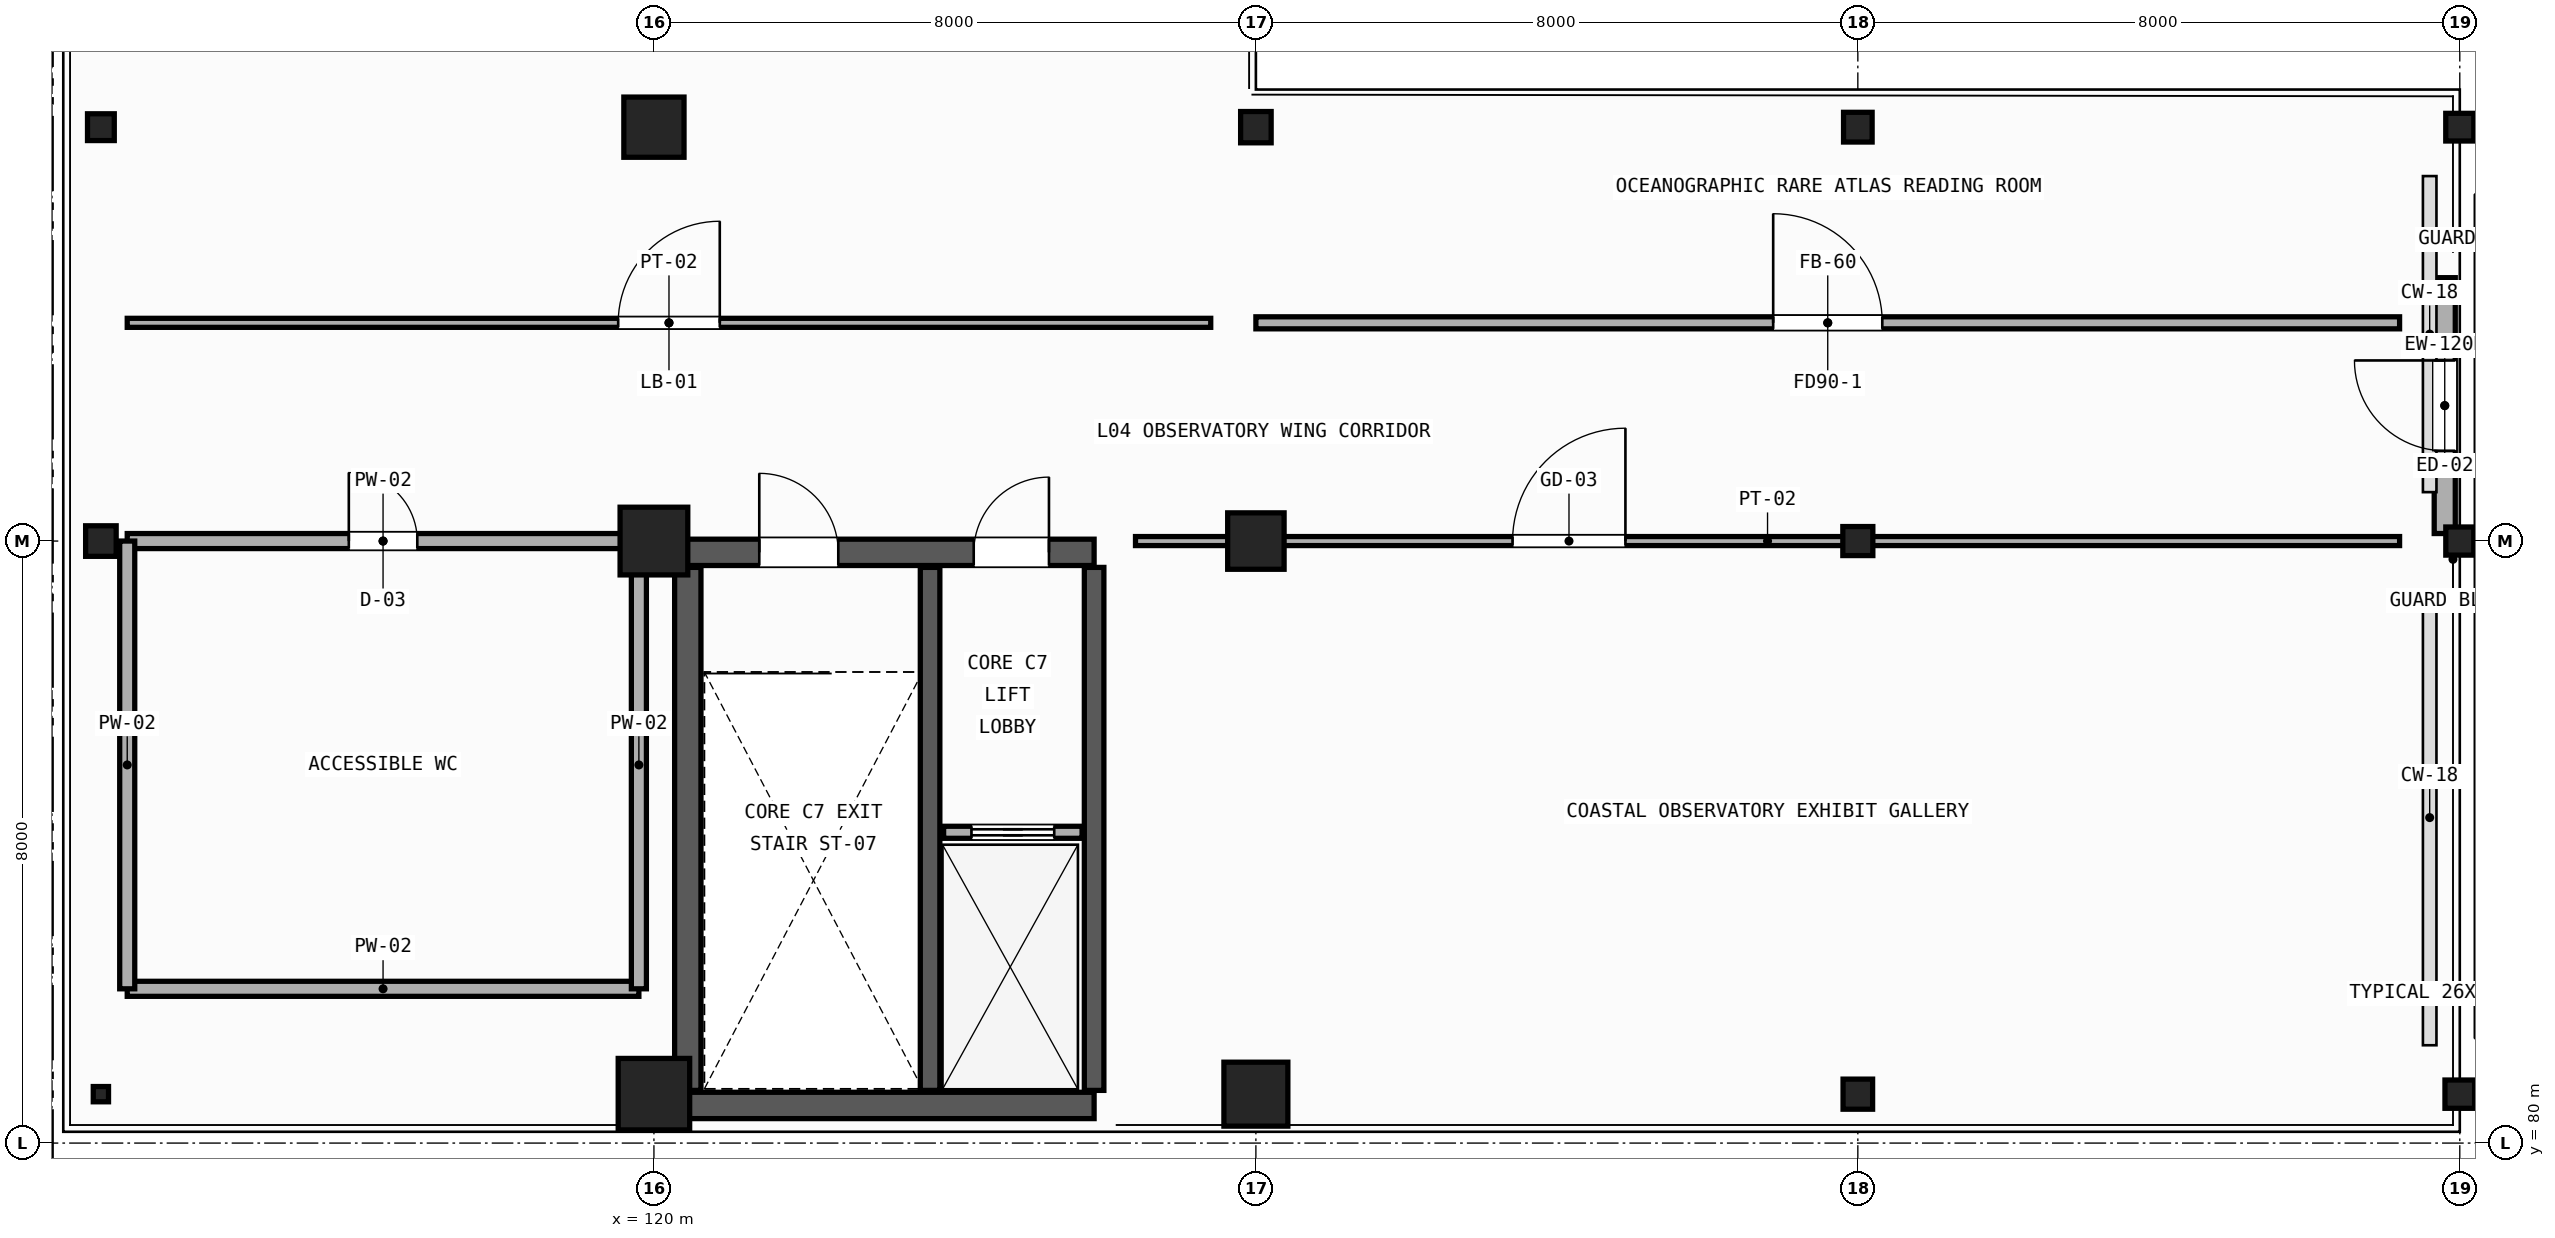
"""IFC4 building model, lengths in metres.
Left out: names, types, materials, properties, quantities, classifications, styles, units other than length and angle.
Written with IfcOpenShell. Run it as: python <this file> out.ifc"""

import sys

from ifc_helpers import new_model, si_unit, direction, frame, frame_2d, origin, origin_2d, place, context, subcontext, project, spatial, rectangle, hollow_rectangle, circle, hollow_circle, i_section, extrude, element, fill, save


model = new_model("IFC4")
c1 = context("Model", 3, precision=1e-05, world=origin(), true_north=direction((0.0, 1.0)))
c2 = subcontext(c1, "Body", "Model", "MODEL_VIEW")
j1 = project(units=[si_unit("LENGTHUNIT", "METRE"), si_unit("PLANEANGLEUNIT", "RADIAN")], contexts=[c1])
p1 = place(None, origin())
s1 = spatial("IfcSite", under=j1, at=p1, CompositionType="ELEMENT")
p2 = place(p1, origin())
s2 = spatial("IfcBuilding", under=s1, at=p2, CompositionType="ELEMENT")
p3 = place(p2, frame((0.0, 0.0, 19.8)))
s3 = spatial("IfcBuildingStorey", under=s2, at=p3, CompositionType="ELEMENT", Elevation=19.8)
p4 = place(p3, frame((112.65, 80.65, 0.0), z_axis=(0.0, 0.0, 1.0), x_axis=(1.0, 0.0, 0.0)))
e1 = element("IfcColumn", 1, at=p4, inside=s3, PredefinedType="COLUMN", context=c2, shape_type="SweptSolid", body=[
    extrude(hollow_rectangle(XDim=0.203, YDim=0.203, WallThickness=0.009, InnerFilletRadius=0.009, OuterFilletRadius=0.018, at=origin_2d()), origin(), (0.0, 0.0, 1.0), 4.8),
])
p5 = place(p3, frame((112.65, 88.0, 0.0), z_axis=(0.0, 0.0, 1.0), x_axis=(0.0, 1.0, 0.0)))
e2 = element("IfcColumn", 2, at=p5, inside=s3, PredefinedType="COLUMN", context=c2, shape_type="SweptSolid", body=[
    extrude(hollow_circle(Radius=0.203, WallThickness=0.012, at=origin_2d()), origin(), (0.0, 0.0, 1.0), 4.8),
])
p6 = place(p3, frame((112.65, 93.5, 0.0), z_axis=(0.0, 0.0, 1.0), x_axis=(1.0, 0.0, 0.0)))
e3 = element("IfcColumn", 3, at=p6, inside=s3, PredefinedType="COLUMN", context=c2, shape_type="SweptSolid", body=[
    extrude(hollow_circle(Radius=0.178, WallThickness=0.012, at=origin_2d()), origin(), (0.0, 0.0, 1.0), 4.8),
])
p7 = place(p3, frame((120.0, 80.65, 0.0), z_axis=(0.0, 0.0, 1.0), x_axis=(0.0, 1.0, 0.0)))
e4 = element("IfcColumn", 4, at=p7, inside=s3, PredefinedType="COLUMN", context=c2, shape_type="SweptSolid", body=[
    extrude(rectangle(XDim=0.95, YDim=0.95, at=origin_2d()), origin(), (0.0, 0.0, 1.0), 4.8),
])
p8 = place(p3, frame((120.0, 88.0, 0.0), z_axis=(0.0, 0.0, 1.0), x_axis=(1.0, 0.0, 0.0)))
e5 = element("IfcColumn", 5, at=p8, inside=s3, PredefinedType="COLUMN", context=c2, shape_type="SweptSolid", body=[
    extrude(rectangle(XDim=0.9, YDim=0.9, at=origin_2d()), origin(), (0.0, 0.0, 1.0), 6.48),
])
p9 = place(p3, frame((120.0, 93.5, 0.0), z_axis=(0.0, 0.0, 1.0), x_axis=(0.0, 1.0, 0.0)))
e6 = element("IfcColumn", 6, at=p9, inside=s3, PredefinedType="COLUMN", context=c2, shape_type="SweptSolid", body=[
    extrude(rectangle(XDim=0.8, YDim=0.8, at=origin_2d()), origin(), (0.0, 0.0, 1.0), 4.8),
])
p10 = place(p3, frame((128.0, 80.65, 0.0), z_axis=(0.0, 0.0, 1.0), x_axis=(1.0, 0.0, 0.0)))
e7 = element("IfcColumn", 7, at=p10, inside=s3, PredefinedType="COLUMN", context=c2, shape_type="SweptSolid", body=[
    extrude(circle(Radius=0.425, at=origin_2d()), origin(), (0.0, 0.0, 1.0), 4.8),
])
p11 = place(p3, frame((128.0, 88.0, 0.0), z_axis=(0.0, 0.0, 1.0), x_axis=(0.0, 1.0, 0.0)))
e8 = element("IfcColumn", 8, at=p11, inside=s3, PredefinedType="COLUMN", context=c2, shape_type="SweptSolid", body=[
    extrude(circle(Radius=0.375, at=origin_2d()), origin(), (0.0, 0.0, 1.0), 6.48),
])
p12 = place(p3, frame((128.0, 93.5, 0.0), z_axis=(0.0, 0.0, 1.0), x_axis=(1.0, 0.0, 0.0)))
e9 = element("IfcColumn", 9, at=p12, inside=s3, PredefinedType="COLUMN", context=c2, shape_type="SweptSolid", body=[
    extrude(i_section(OverallWidth=0.406, OverallDepth=0.416, WebThickness=0.03, FlangeThickness=0.048, FilletRadius=0.015, at=origin_2d()), origin(), (0.0, 0.0, 1.0), 4.8),
])
p13 = place(p3, frame((136.0, 80.65, 0.0), z_axis=(0.0, 0.0, 1.0), x_axis=(0.0, 1.0, 0.0)))
e10 = element("IfcColumn", 10, at=p13, inside=s3, PredefinedType="COLUMN", context=c2, shape_type="SweptSolid", body=[
    extrude(i_section(OverallWidth=0.4, OverallDepth=0.393, WebThickness=0.023, FlangeThickness=0.037, FilletRadius=0.015, at=origin_2d()), origin(), (0.0, 0.0, 1.0), 4.8),
])
p14 = place(p3, frame((136.0, 88.0, 0.0), z_axis=(0.0, 0.0, 1.0), x_axis=(1.0, 0.0, 0.0)))
e11 = element("IfcColumn", 11, at=p14, inside=s3, PredefinedType="COLUMN", context=c2, shape_type="SweptSolid", body=[
    extrude(i_section(OverallWidth=0.399, OverallDepth=0.386, WebThickness=0.021, FlangeThickness=0.033, FilletRadius=0.015, at=origin_2d()), origin(), (0.0, 0.0, 1.0), 6.48),
])
p15 = place(p3, frame((136.0, 93.5, 0.0), z_axis=(0.0, 0.0, 1.0), x_axis=(0.0, 1.0, 0.0)))
e12 = element("IfcColumn", 12, at=p15, inside=s3, PredefinedType="COLUMN", context=c2, shape_type="SweptSolid", body=[
    extrude(i_section(OverallWidth=0.395, OverallDepth=0.38, WebThickness=0.019, FlangeThickness=0.03, FilletRadius=0.015, at=origin_2d()), origin(), (0.0, 0.0, 1.0), 4.8),
])
p16 = place(p3, frame((144.0, 80.65, 0.0), z_axis=(0.0, 0.0, 1.0), x_axis=(1.0, 0.0, 0.0)))
e13 = element("IfcColumn", 13, at=p16, inside=s3, PredefinedType="COLUMN", context=c2, shape_type="SweptSolid", body=[
    extrude(i_section(OverallWidth=0.394, OverallDepth=0.376, WebThickness=0.017, FlangeThickness=0.028, FilletRadius=0.015, at=origin_2d()), origin(), (0.0, 0.0, 1.0), 4.8),
])
p17 = place(p3, frame((144.0, 88.0, 0.0), z_axis=(0.0, 0.0, 1.0), x_axis=(0.0, 1.0, 0.0)))
e14 = element("IfcColumn", 14, at=p17, inside=s3, PredefinedType="COLUMN", context=c2, shape_type="SweptSolid", body=[
    extrude(i_section(OverallWidth=0.374, OverallDepth=0.372, WebThickness=0.016, FlangeThickness=0.026, FilletRadius=0.015, at=origin_2d()), origin(), (0.0, 0.0, 1.0), 4.8),
])
p18 = place(p3, frame((144.0, 93.5, 0.0), z_axis=(0.0, 0.0, 1.0), x_axis=(1.0, 0.0, 0.0)))
e15 = element("IfcColumn", 15, at=p18, inside=s3, PredefinedType="COLUMN", context=c2, shape_type="SweptSolid", body=[
    extrude(i_section(OverallWidth=0.373, OverallDepth=0.368, WebThickness=0.015, FlangeThickness=0.024, FilletRadius=0.015, at=origin_2d()), origin(), (0.0, 0.0, 1.0), 4.8),
])
p19 = place(p3, frame((143.8, 88.1, 0.0), z_axis=(0.0, 0.0, 1.0), x_axis=(0.0, 1.0, 0.0)))
e16 = element("IfcWall", 16, at=p19, inside=s3, PredefinedType="STANDARD", context=c2, shape_type="SweptSolid", body=[
    extrude(rectangle(XDim=3.4, YDim=0.28, at=frame_2d((1.7, 0.0))), origin(), (0.0, 0.0, 1.0), 4.4),
])
p20 = place(p19, frame((1.1, 0.0, 0.0)))
e17 = element("IfcOpeningElement", 17, at=p20, cuts=e16, PredefinedType="OPENING", context=c2, shape_type="SweptSolid", body=[
    extrude(rectangle(XDim=1.2, YDim=2.15, at=frame_2d((0.6, 1.075))), frame((0.0, 0.15, 0.0), z_axis=(0.0, -1.0, 0.0), x_axis=(1.0, 0.0, 0.0)), (0.0, 0.0, 1.0), 0.3),
])
p21 = place(p3, frame((120.0, 87.85, 0.0), z_axis=(0.0, 0.0, 1.0), x_axis=(1.0, 0.0, 0.0)))
e18 = element("IfcWall", 18, at=p21, inside=s3, PredefinedType="SHEAR", context=c2, shape_type="SweptSolid", body=[
    extrude(rectangle(XDim=5.85, YDim=0.35, at=frame_2d((2.925, 0.0))), origin(), (0.0, 0.0, 1.0), 4.3),
])
p22 = place(p21, frame((1.4, 0.0, 0.0)))
e19 = element("IfcOpeningElement", 19, at=p22, cuts=e18, PredefinedType="OPENING", context=c2, shape_type="SweptSolid", body=[
    extrude(rectangle(XDim=1.05, YDim=2.1, at=frame_2d((0.525, 1.05))), frame((0.0, 0.185, 0.0), z_axis=(0.0, -1.0, 0.0), x_axis=(1.0, 0.0, 0.0)), (0.0, 0.0, 1.0), 0.37),
])
p23 = place(p21, frame((4.25, 0.0, 0.0)))
e20 = element("IfcOpeningElement", 20, at=p23, cuts=e18, PredefinedType="OPENING", context=c2, shape_type="SweptSolid", body=[
    extrude(rectangle(XDim=1.0, YDim=2.15, at=frame_2d((0.5, 1.075))), frame((0.0, 0.185, 0.0), z_axis=(0.0, -1.0, 0.0), x_axis=(1.0, 0.0, 0.0)), (0.0, 0.0, 1.0), 0.37),
])
p24 = place(p3, frame((120.0, 80.5, 0.0), z_axis=(0.0, 0.0, 1.0), x_axis=(1.0, 0.0, 0.0)))
e21 = element("IfcWall", 21, at=p24, inside=s3, PredefinedType="SHEAR", context=c2, shape_type="SweptSolid", body=[
    extrude(rectangle(XDim=5.85, YDim=0.35, at=frame_2d((2.925, 0.0))), origin(), (0.0, 0.0, 1.0), 4.3),
])
p25 = place(p3, frame((120.45, 80.7, 0.0), z_axis=(0.0, 0.0, 1.0), x_axis=(0.0, 1.0, 0.0)))
e22 = element("IfcWall", 22, at=p25, inside=s3, PredefinedType="SHEAR", context=c2, shape_type="SweptSolid", body=[
    extrude(rectangle(XDim=6.95, YDim=0.35, at=frame_2d((3.475, 0.0))), origin(), (0.0, 0.0, 1.0), 4.3),
])
for number, where, z_axis, x_axis in (
    (23, (125.85, 80.7, 0.0), (0.0, 0.0, 1.0), (0.0, 1.0, 0.0)),
    (24, (123.67, 80.7, 0.0), (0.0, 0.0, 1.0), (0.0, 1.0, 0.0)),
):
    element("IfcWall", number, at=place(p3, frame(where, z_axis=z_axis, x_axis=x_axis)), inside=s3, PredefinedType="SHEAR", context=c2, shape_type="SweptSolid", body=[
        extrude(rectangle(XDim=6.95, YDim=0.26, at=frame_2d((3.475, 0.0))), origin(), (0.0, 0.0, 1.0), 4.3),
    ])
p26 = place(p3, frame((123.85, 84.13, 0.0), z_axis=(0.0, 0.0, 1.0), x_axis=(1.0, 0.0, 0.0)))
e25 = element("IfcWall", 25, at=p26, inside=s3, PredefinedType="PARTITIONING", context=c2, shape_type="SweptSolid", body=[
    extrude(rectangle(XDim=1.84, YDim=0.16, at=frame_2d((0.92, 0.0))), origin(), (0.0, 0.0, 1.0), 3.6),
])
p27 = place(p26, frame((0.37, 0.0, 0.0)))
e26 = element("IfcOpeningElement", 26, at=p27, cuts=e25, PredefinedType="OPENING", context=c2, shape_type="SweptSolid", body=[
    extrude(rectangle(XDim=1.1, YDim=2.15, at=frame_2d((0.55, 1.075))), frame((0.0, 0.09, 0.0), z_axis=(0.0, -1.0, 0.0), x_axis=(1.0, 0.0, 0.0)), (0.0, 0.0, 1.0), 0.18),
])
p28 = place(p3, frame((113.0, 88.0, 0.0), z_axis=(0.0, 0.0, 1.0), x_axis=(1.0, 0.0, 0.0)))
e27 = element("IfcWall", 27, at=p28, inside=s3, PredefinedType="PLUMBINGWALL", context=c2, shape_type="SweptSolid", body=[
    extrude(rectangle(XDim=6.8, YDim=0.2, at=frame_2d((3.4, 0.0))), origin(), (0.0, 0.0, 1.0), 4.29),
])
p29 = place(p28, frame((2.945, 0.0, 0.0)))
e28 = element("IfcOpeningElement", 28, at=p29, cuts=e27, PredefinedType="OPENING", context=c2, shape_type="SweptSolid", body=[
    extrude(rectangle(XDim=0.91, YDim=2.1, at=frame_2d((0.455, 1.05))), frame((0.0, 0.11, 0.0), z_axis=(0.0, -1.0, 0.0), x_axis=(1.0, 0.0, 0.0)), (0.0, 0.0, 1.0), 0.22),
])
p30 = place(p3, frame((113.0, 82.05, 0.0), z_axis=(0.0, 0.0, 1.0), x_axis=(1.0, 0.0, 0.0)))
e29 = element("IfcWall", 29, at=p30, inside=s3, PredefinedType="PLUMBINGWALL", context=c2, shape_type="SweptSolid", body=[
    extrude(rectangle(XDim=6.8, YDim=0.2, at=frame_2d((3.4, 0.0))), origin(), (0.0, 0.0, 1.0), 4.29),
])
for number, where, z_axis, x_axis in (
    (30, (113.0, 82.05, 0.0), (0.0, 0.0, 1.0), (0.0, 1.0, 0.0)),
    (31, (119.8, 82.05, 0.0), (0.0, 0.0, 1.0), (0.0, 1.0, 0.0)),
):
    element("IfcWall", number, at=place(p3, frame(where, z_axis=z_axis, x_axis=x_axis)), inside=s3, PredefinedType="PLUMBINGWALL", context=c2, shape_type="SweptSolid", body=[
        extrude(rectangle(XDim=5.95, YDim=0.2, at=frame_2d((2.975, 0.0))), origin(), (0.0, 0.0, 1.0), 4.29),
    ])
p31 = place(p3, frame((126.4, 88.0, 0.0), z_axis=(0.0, 0.0, 1.0), x_axis=(1.0, 0.0, 0.0)))
e32 = element("IfcWall", 32, at=p31, inside=s3, PredefinedType="PARTITIONING", context=c2, shape_type="SweptSolid", body=[
    extrude(rectangle(XDim=16.8, YDim=0.12, at=frame_2d((8.4, 0.0))), origin(), (0.0, 0.0, 1.0), 4.29),
])
p32 = place(p31, frame((5.011, 0.0, 0.0)))
e33 = element("IfcOpeningElement", 33, at=p32, cuts=e32, PredefinedType="OPENING", context=c2, shape_type="SweptSolid", body=[
    extrude(rectangle(XDim=1.5, YDim=2.3, at=frame_2d((0.75, 1.15))), frame((0.0, 0.07, 0.0), z_axis=(0.0, -1.0, 0.0), x_axis=(1.0, 0.0, 0.0)), (0.0, 0.0, 1.0), 0.14),
])
p33 = place(p3, frame((128.0, 90.9, 0.0), z_axis=(0.0, 0.0, 1.0), x_axis=(1.0, 0.0, 0.0)))
e34 = element("IfcWall", 34, at=p33, inside=s3, PredefinedType="PARTITIONING", context=c2, shape_type="SweptSolid", body=[
    extrude(rectangle(XDim=15.2, YDim=0.16, at=frame_2d((7.6, 0.0))), origin(), (0.0, 0.0, 1.0), 4.29),
])
p34 = place(p33, frame((6.875, 0.0, 0.0)))
e35 = element("IfcOpeningElement", 35, at=p34, cuts=e34, PredefinedType="OPENING", context=c2, shape_type="SweptSolid", body=[
    extrude(rectangle(XDim=1.45, YDim=2.25, at=frame_2d((0.725, 1.125))), frame((0.0, 0.09, 0.0), z_axis=(0.0, -1.0, 0.0), x_axis=(1.0, 0.0, 0.0)), (0.0, 0.0, 1.0), 0.18),
])
p35 = place(p3, frame((113.0, 90.9, 0.0), z_axis=(0.0, 0.0, 1.0), x_axis=(1.0, 0.0, 0.0)))
e36 = element("IfcWall", 36, at=p35, inside=s3, PredefinedType="PARTITIONING", context=c2, shape_type="SweptSolid", body=[
    extrude(rectangle(XDim=14.4, YDim=0.12, at=frame_2d((7.2, 0.0))), origin(), (0.0, 0.0, 1.0), 4.29),
])
p36 = place(p35, frame((6.525, 0.0, 0.0)))
e37 = element("IfcOpeningElement", 37, at=p36, cuts=e36, PredefinedType="OPENING", context=c2, shape_type="SweptSolid", body=[
    extrude(rectangle(XDim=1.35, YDim=2.25, at=frame_2d((0.675, 1.125))), frame((0.0, 0.07, 0.0), z_axis=(0.0, -1.0, 0.0), x_axis=(1.0, 0.0, 0.0)), (0.0, 0.0, 1.0), 0.14),
])
p37 = place(p20, origin())
e38 = element("IfcDoor", 38, at=p37, inside=s3, OperationType="SINGLE_SWING_RIGHT", PredefinedType="DOOR", context=c2, shape_type="SweptSolid", body=[
    extrude(rectangle(XDim=1.2, YDim=2.15, at=frame_2d((0.6, 1.075))), frame((0.0, 0.025, 0.0), z_axis=(0.0, -1.0, 0.0), x_axis=(1.0, 0.0, 0.0)), (0.0, 0.0, 1.0), 0.05),
])
fill(e17, e38)
p38 = place(p27, origin())
e39 = element("IfcDoor", 39, at=p38, inside=s3, OperationType="SLIDING_TO_LEFT", PredefinedType="DOOR", context=c2, shape_type="SweptSolid", body=[
    extrude(rectangle(XDim=1.1, YDim=2.15, at=frame_2d((0.55, 1.075))), frame((0.0, 0.025, 0.0), z_axis=(0.0, -1.0, 0.0), x_axis=(1.0, 0.0, 0.0)), (0.0, 0.0, 1.0), 0.05),
])
fill(e26, e39)
p39 = place(p22, origin())
e40 = element("IfcDoor", 40, at=p39, inside=s3, OperationType="SINGLE_SWING_LEFT", PredefinedType="DOOR", context=c2, shape_type="SweptSolid", body=[
    extrude(rectangle(XDim=1.05, YDim=2.1, at=frame_2d((0.525, 1.05))), frame((0.0, 0.025, 0.0), z_axis=(0.0, -1.0, 0.0), x_axis=(1.0, 0.0, 0.0)), (0.0, 0.0, 1.0), 0.05),
])
fill(e19, e40)
p40 = place(p23, origin())
e41 = element("IfcDoor", 41, at=p40, inside=s3, OperationType="SINGLE_SWING_RIGHT", PredefinedType="DOOR", context=c2, shape_type="SweptSolid", body=[
    extrude(rectangle(XDim=1.0, YDim=2.15, at=frame_2d((0.5, 1.075))), frame((0.0, 0.025, 0.0), z_axis=(0.0, -1.0, 0.0), x_axis=(1.0, 0.0, 0.0)), (0.0, 0.0, 1.0), 0.05),
])
fill(e20, e41)
p41 = place(p29, origin())
e42 = element("IfcDoor", 42, at=p41, inside=s3, OperationType="SINGLE_SWING_LEFT", PredefinedType="DOOR", context=c2, shape_type="SweptSolid", body=[
    extrude(rectangle(XDim=0.91, YDim=2.1, at=frame_2d((0.455, 1.05))), frame((0.0, 0.025, 0.0), z_axis=(0.0, -1.0, 0.0), x_axis=(1.0, 0.0, 0.0)), (0.0, 0.0, 1.0), 0.05),
])
fill(e28, e42)
p42 = place(p32, origin())
e43 = element("IfcDoor", 43, at=p42, inside=s3, OperationType="SINGLE_SWING_RIGHT", PredefinedType="DOOR", context=c2, shape_type="SweptSolid", body=[
    extrude(rectangle(XDim=1.5, YDim=2.3, at=frame_2d((0.75, 1.15))), frame((0.0, 0.025, 0.0), z_axis=(0.0, -1.0, 0.0), x_axis=(1.0, 0.0, 0.0)), (0.0, 0.0, 1.0), 0.05),
])
fill(e33, e43)
p43 = place(p34, origin())
e44 = element("IfcDoor", 44, at=p43, inside=s3, OperationType="SINGLE_SWING_LEFT", PredefinedType="DOOR", context=c2, shape_type="SweptSolid", body=[
    extrude(rectangle(XDim=1.45, YDim=2.25, at=frame_2d((0.725, 1.125))), frame((0.0, 0.025, 0.0), z_axis=(0.0, -1.0, 0.0), x_axis=(1.0, 0.0, 0.0)), (0.0, 0.0, 1.0), 0.05),
])
fill(e35, e44)
p44 = place(p36, origin())
e45 = element("IfcDoor", 45, at=p44, inside=s3, OperationType="SINGLE_SWING_RIGHT", PredefinedType="DOOR", context=c2, shape_type="SweptSolid", body=[
    extrude(rectangle(XDim=1.35, YDim=2.25, at=frame_2d((0.675, 1.125))), frame((0.0, 0.025, 0.0), z_axis=(0.0, -1.0, 0.0), x_axis=(1.0, 0.0, 0.0)), (0.0, 0.0, 1.0), 0.05),
])
fill(e37, e45)
save(model, sys.argv[1])
